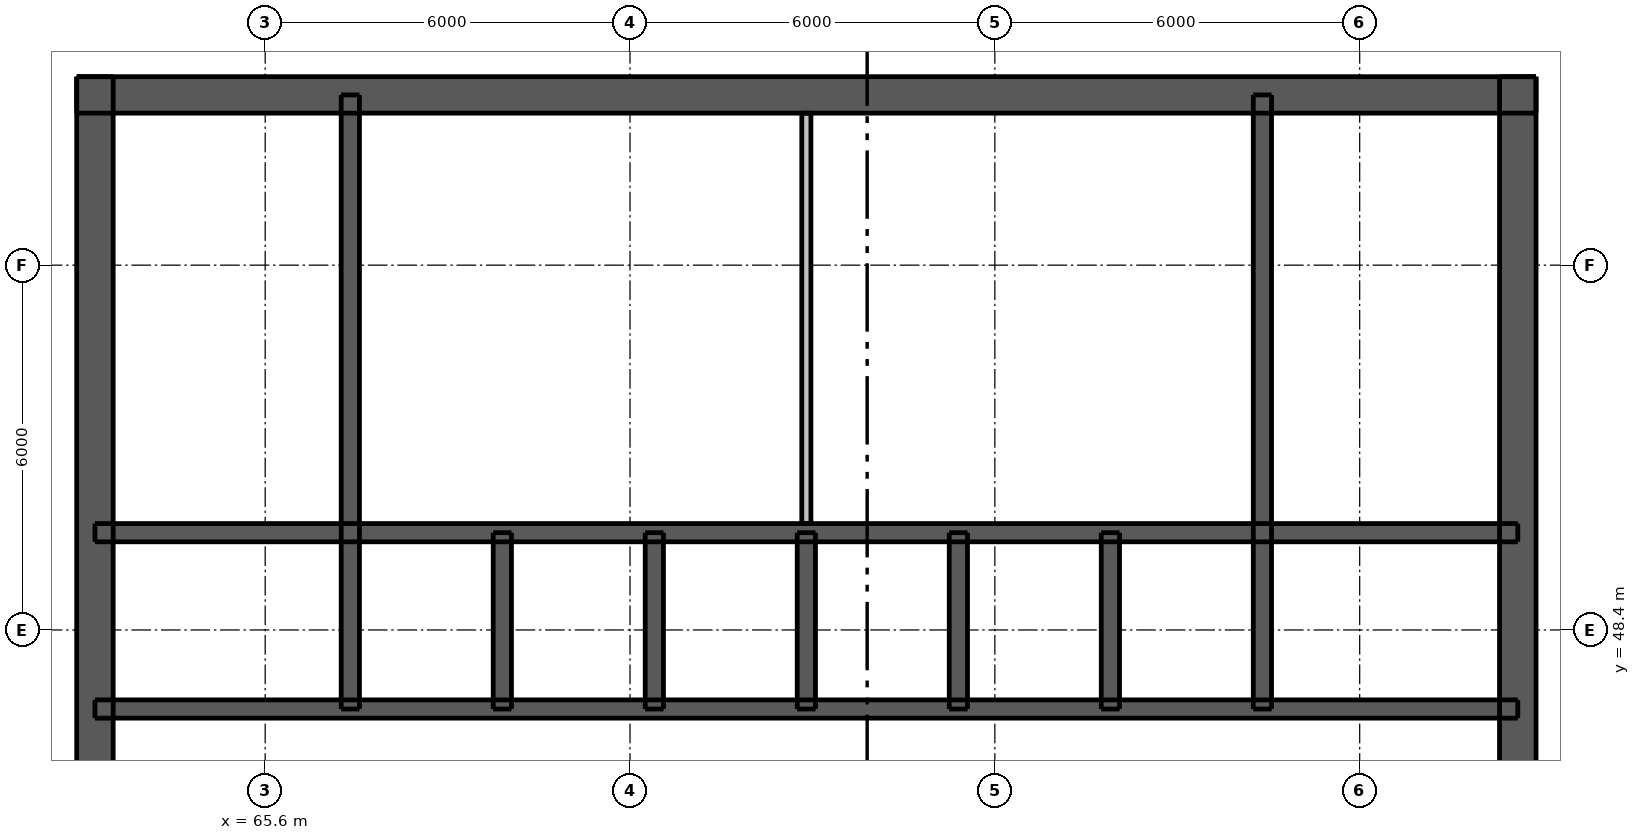
"""IFC4 building model, lengths in metres.
Left out: names, types, materials, properties, quantities, classifications, styles, units other than length and angle.
Written with IfcOpenShell. Run it as: python <this file> out.ifc"""

import sys

from ifc_helpers import new_model, si_unit, direction, frame, frame_2d, origin, place, context, subcontext, project, spatial, rectangle, extrude, element, fill, save


model = new_model("IFC4")
c1 = context("Model", 3, precision=1e-05, world=origin(), true_north=direction((0.0, 1.0)))
c2 = subcontext(c1, "Body", "Model", "MODEL_VIEW")
j1 = project(units=[si_unit("LENGTHUNIT", "METRE"), si_unit("PLANEANGLEUNIT", "RADIAN")], contexts=[c1])
p1 = place(None, origin())
s1 = spatial("IfcSite", under=j1, at=p1, CompositionType="ELEMENT")
p2 = place(p1, origin())
s2 = spatial("IfcBuilding", under=s1, at=p2, CompositionType="ELEMENT")
p3 = place(p2, frame((0.0, 0.0, 210.1)))
s3 = spatial("IfcBuildingStorey", under=s2, at=p3, CompositionType="ELEMENT", Elevation=210.1)
p4 = place(p3, frame((62.5, 57.2, 0.0), z_axis=(0.0, 0.0, 1.0), x_axis=(1.0, 0.0, 0.0)))
e1 = element("IfcWall", 1, at=p4, inside=s3, PredefinedType="SHEAR", context=c2, shape_type="SweptSolid", body=[
    extrude(rectangle(XDim=24.0, YDim=0.6, at=frame_2d((12.0, 0.0))), origin(), (0.0, 0.0, 1.0), 3.05),
])
p5 = place(p4, frame((20.975, 0.0, 0.0)))
e2 = element("IfcOpeningElement", 2, at=p5, cuts=e1, PredefinedType="OPENING", context=c2, shape_type="SweptSolid", body=[
    extrude(rectangle(XDim=1.1, YDim=2.1, at=frame_2d((0.55, 1.05))), frame((0.0, 0.31, 0.0), z_axis=(0.0, -1.0, 0.0), x_axis=(1.0, 0.0, 0.0)), (0.0, 0.0, 1.0), 0.62),
])
p6 = place(p4, frame((1.925, 0.0, 0.0)))
e3 = element("IfcOpeningElement", 3, at=p6, cuts=e1, PredefinedType="OPENING", context=c2, shape_type="SweptSolid", body=[
    extrude(rectangle(XDim=1.1, YDim=2.1, at=frame_2d((0.55, 1.05))), frame((0.0, 0.31, 0.0), z_axis=(0.0, -1.0, 0.0), x_axis=(1.0, 0.0, 0.0)), (0.0, 0.0, 1.0), 0.62),
])
p7 = place(p4, frame((7.875, 0.0, 0.0)))
e4 = element("IfcOpeningElement", 4, at=p7, cuts=e1, PredefinedType="OPENING", context=c2, shape_type="SweptSolid", body=[
    extrude(rectangle(XDim=0.9, YDim=2.1, at=frame_2d((0.45, 1.05))), frame((0.0, 0.31, 0.0), z_axis=(0.0, -1.0, 0.0), x_axis=(1.0, 0.0, 0.0)), (0.0, 0.0, 1.0), 0.62),
])
p8 = place(p4, frame((15.225, 0.0, 0.0)))
e5 = element("IfcOpeningElement", 5, at=p8, cuts=e1, PredefinedType="OPENING", context=c2, shape_type="SweptSolid", body=[
    extrude(rectangle(XDim=0.9, YDim=2.1, at=frame_2d((0.45, 1.05))), frame((0.0, 0.31, 0.0), z_axis=(0.0, -1.0, 0.0), x_axis=(1.0, 0.0, 0.0)), (0.0, 0.0, 1.0), 0.62),
])
p9 = place(p3, frame((62.8, 33.5, 0.0), z_axis=(0.0, 0.0, 1.0), x_axis=(0.0, 1.0, 0.0)))
e6 = element("IfcWall", 6, at=p9, inside=s3, PredefinedType="SHEAR", context=c2, shape_type="SweptSolid", body=[
    extrude(rectangle(XDim=24.0, YDim=0.6, at=frame_2d((12.0, 0.0))), origin(), (0.0, 0.0, 1.0), 3.05),
])
p10 = place(p9, frame((11.2, 0.0, 0.0)))
e7 = element("IfcOpeningElement", 7, at=p10, cuts=e6, PredefinedType="OPENING", context=c2, shape_type="SweptSolid", body=[
    extrude(rectangle(XDim=1.6, YDim=2.1, at=frame_2d((0.8, 1.05))), frame((0.0, 0.31, 0.0), z_axis=(0.0, -1.0, 0.0), x_axis=(1.0, 0.0, 0.0)), (0.0, 0.0, 1.0), 0.62),
])
p11 = place(p3, frame((86.2, 33.5, 0.0), z_axis=(0.0, 0.0, 1.0), x_axis=(0.0, 1.0, 0.0)))
e8 = element("IfcWall", 8, at=p11, inside=s3, PredefinedType="SHEAR", context=c2, shape_type="SweptSolid", body=[
    extrude(rectangle(XDim=24.0, YDim=0.6, at=frame_2d((12.0, 0.0))), origin(), (0.0, 0.0, 1.0), 3.05),
])
p12 = place(p11, frame((11.2, 0.0, 0.0)))
e9 = element("IfcOpeningElement", 9, at=p12, cuts=e8, PredefinedType="OPENING", context=c2, shape_type="SweptSolid", body=[
    extrude(rectangle(XDim=1.6, YDim=2.1, at=frame_2d((0.8, 1.05))), frame((0.0, 0.31, 0.0), z_axis=(0.0, -1.0, 0.0), x_axis=(1.0, 0.0, 0.0)), (0.0, 0.0, 1.0), 0.62),
])
p13 = place(p3, frame((62.8, 47.1, 0.0), z_axis=(0.0, 0.0, 1.0), x_axis=(1.0, 0.0, 0.0)))
e10 = element("IfcWall", 10, at=p13, inside=s3, PredefinedType="SHEAR", context=c2, shape_type="SweptSolid", body=[
    extrude(rectangle(XDim=23.4, YDim=0.3, at=frame_2d((11.7, 0.0))), origin(), (0.0, 0.0, 1.0), 3.05),
])
p14 = place(p13, frame((1.725, 0.0, 0.0)))
e11 = element("IfcOpeningElement", 11, at=p14, cuts=e10, PredefinedType="OPENING", context=c2, shape_type="SweptSolid", body=[
    extrude(rectangle(XDim=0.9, YDim=2.1, at=frame_2d((0.45, 1.05))), frame((0.0, 0.16, 0.0), z_axis=(0.0, -1.0, 0.0), x_axis=(1.0, 0.0, 0.0)), (0.0, 0.0, 1.0), 0.32),
])
p15 = place(p13, frame((20.775, 0.0, 0.0)))
e12 = element("IfcOpeningElement", 12, at=p15, cuts=e10, PredefinedType="OPENING", context=c2, shape_type="SweptSolid", body=[
    extrude(rectangle(XDim=0.9, YDim=2.1, at=frame_2d((0.45, 1.05))), frame((0.0, 0.16, 0.0), z_axis=(0.0, -1.0, 0.0), x_axis=(1.0, 0.0, 0.0)), (0.0, 0.0, 1.0), 0.32),
])
p16 = place(p13, frame((4.9, 0.0, 0.0)))
e13 = element("IfcOpeningElement", 13, at=p16, cuts=e10, PredefinedType="OPENING", context=c2, shape_type="SweptSolid", body=[
    extrude(rectangle(XDim=1.1, YDim=2.1, at=frame_2d((0.55, 1.05))), frame((0.0, 0.16, 0.0), z_axis=(0.0, -1.0, 0.0), x_axis=(1.0, 0.0, 0.0)), (0.0, 0.0, 1.0), 0.32),
])
p17 = place(p13, frame((7.4, 0.0, 0.0)))
e14 = element("IfcOpeningElement", 14, at=p17, cuts=e10, PredefinedType="OPENING", context=c2, shape_type="SweptSolid", body=[
    extrude(rectangle(XDim=1.1, YDim=2.1, at=frame_2d((0.55, 1.05))), frame((0.0, 0.16, 0.0), z_axis=(0.0, -1.0, 0.0), x_axis=(1.0, 0.0, 0.0)), (0.0, 0.0, 1.0), 0.32),
])
p18 = place(p13, frame((9.9, 0.0, 0.0)))
e15 = element("IfcOpeningElement", 15, at=p18, cuts=e10, PredefinedType="OPENING", context=c2, shape_type="SweptSolid", body=[
    extrude(rectangle(XDim=1.1, YDim=2.1, at=frame_2d((0.55, 1.05))), frame((0.0, 0.16, 0.0), z_axis=(0.0, -1.0, 0.0), x_axis=(1.0, 0.0, 0.0)), (0.0, 0.0, 1.0), 0.32),
])
p19 = place(p13, frame((12.4, 0.0, 0.0)))
e16 = element("IfcOpeningElement", 16, at=p19, cuts=e10, PredefinedType="OPENING", context=c2, shape_type="SweptSolid", body=[
    extrude(rectangle(XDim=1.1, YDim=2.1, at=frame_2d((0.55, 1.05))), frame((0.0, 0.16, 0.0), z_axis=(0.0, -1.0, 0.0), x_axis=(1.0, 0.0, 0.0)), (0.0, 0.0, 1.0), 0.32),
])
p20 = place(p13, frame((14.9, 0.0, 0.0)))
e17 = element("IfcOpeningElement", 17, at=p20, cuts=e10, PredefinedType="OPENING", context=c2, shape_type="SweptSolid", body=[
    extrude(rectangle(XDim=1.1, YDim=2.1, at=frame_2d((0.55, 1.05))), frame((0.0, 0.16, 0.0), z_axis=(0.0, -1.0, 0.0), x_axis=(1.0, 0.0, 0.0)), (0.0, 0.0, 1.0), 0.32),
])
p21 = place(p13, frame((17.4, 0.0, 0.0)))
e18 = element("IfcOpeningElement", 18, at=p21, cuts=e10, PredefinedType="OPENING", context=c2, shape_type="SweptSolid", body=[
    extrude(rectangle(XDim=1.1, YDim=2.1, at=frame_2d((0.55, 1.05))), frame((0.0, 0.16, 0.0), z_axis=(0.0, -1.0, 0.0), x_axis=(1.0, 0.0, 0.0)), (0.0, 0.0, 1.0), 0.32),
])
p22 = place(p3, frame((62.8, 50.0, 0.0), z_axis=(0.0, 0.0, 1.0), x_axis=(1.0, 0.0, 0.0)))
e19 = element("IfcWall", 19, at=p22, inside=s3, PredefinedType="SHEAR", context=c2, shape_type="SweptSolid", body=[
    extrude(rectangle(XDim=23.4, YDim=0.3, at=frame_2d((11.7, 0.0))), origin(), (0.0, 0.0, 1.0), 3.05),
])
for number, where, z_axis, x_axis in (
    (20, (67.0, 47.1, 0.0), (0.0, 0.0, 1.0), (0.0, 1.0, 0.0)),
    (21, (82.0, 47.1, 0.0), (0.0, 0.0, 1.0), (0.0, 1.0, 0.0)),
):
    element("IfcWall", number, at=place(p3, frame(where, z_axis=z_axis, x_axis=x_axis)), inside=s3, PredefinedType="SHEAR", context=c2, shape_type="SweptSolid", body=[
        extrude(rectangle(XDim=10.1, YDim=0.3, at=frame_2d((5.05, 0.0))), origin(), (0.0, 0.0, 1.0), 3.05),
    ])
for number, where, z_axis, x_axis in (
    (22, (69.5, 47.1, 0.0), (0.0, 0.0, 1.0), (0.0, 1.0, 0.0)),
    (23, (72.0, 47.1, 0.0), (0.0, 0.0, 1.0), (0.0, 1.0, 0.0)),
    (24, (74.5, 47.1, 0.0), (0.0, 0.0, 1.0), (0.0, 1.0, 0.0)),
    (25, (77.0, 47.1, 0.0), (0.0, 0.0, 1.0), (0.0, 1.0, 0.0)),
    (26, (79.5, 47.1, 0.0), (0.0, 0.0, 1.0), (0.0, 1.0, 0.0)),
):
    element("IfcWall", number, at=place(p3, frame(where, z_axis=z_axis, x_axis=x_axis)), inside=s3, PredefinedType="SHEAR", context=c2, shape_type="SweptSolid", body=[
        extrude(rectangle(XDim=2.9, YDim=0.3, at=frame_2d((1.45, 0.0))), origin(), (0.0, 0.0, 1.0), 3.05),
    ])
p23 = place(p3, frame((74.5, 50.15, 0.0), z_axis=(0.0, 0.0, 1.0), x_axis=(0.0, 1.0, 0.0)))
e27 = element("IfcWall", 27, at=p23, inside=s3, PredefinedType="PLUMBINGWALL", context=c2, shape_type="SweptSolid", body=[
    extrude(rectangle(XDim=6.75, YDim=0.15, at=frame_2d((3.375, 0.0))), origin(), (0.0, 0.0, 1.0), 3.05),
])
p24 = place(p5, origin())
e28 = element("IfcDoor", 28, at=p24, inside=s3, OperationType="SINGLE_SWING_RIGHT", PredefinedType="DOOR", context=c2, shape_type="SweptSolid", body=[
    extrude(rectangle(XDim=1.1, YDim=2.1, at=frame_2d((0.55, 1.05))), frame((0.0, -0.237, 0.0), z_axis=(0.0, -1.0, 0.0), x_axis=(1.0, 0.0, 0.0)), (0.0, 0.0, 1.0), 0.05),
])
fill(e2, e28)
p25 = place(p6, origin())
e29 = element("IfcDoor", 29, at=p25, inside=s3, OperationType="SINGLE_SWING_LEFT", PredefinedType="DOOR", context=c2, shape_type="SweptSolid", body=[
    extrude(rectangle(XDim=1.1, YDim=2.1, at=frame_2d((0.55, 1.05))), frame((0.0, -0.237, 0.0), z_axis=(0.0, -1.0, 0.0), x_axis=(1.0, 0.0, 0.0)), (0.0, 0.0, 1.0), 0.05),
])
fill(e3, e29)
p26 = place(p10, origin())
e30 = element("IfcDoor", 30, at=p26, inside=s3, OperationType="DOUBLE_DOOR_SINGLE_SWING", PredefinedType="DOOR", context=c2, shape_type="SweptSolid", body=[
    extrude(rectangle(XDim=1.6, YDim=2.1, at=frame_2d((0.8, 1.05))), frame((0.0, -0.237, 0.0), z_axis=(0.0, -1.0, 0.0), x_axis=(1.0, 0.0, 0.0)), (0.0, 0.0, 1.0), 0.05),
])
fill(e7, e30)
p27 = place(p12, origin())
e31 = element("IfcDoor", 31, at=p27, inside=s3, OperationType="DOUBLE_DOOR_SINGLE_SWING", PredefinedType="DOOR", context=c2, shape_type="SweptSolid", body=[
    extrude(rectangle(XDim=1.6, YDim=2.1, at=frame_2d((0.8, 1.05))), frame((0.0, 0.288, 0.0), z_axis=(0.0, -1.0, 0.0), x_axis=(1.0, 0.0, 0.0)), (0.0, 0.0, 1.0), 0.05),
])
fill(e9, e31)
p28 = place(p14, origin())
e32 = element("IfcDoor", 32, at=p28, inside=s3, OperationType="SINGLE_SWING_LEFT", PredefinedType="DOOR", context=c2, shape_type="SweptSolid", body=[
    extrude(rectangle(XDim=0.9, YDim=2.1, at=frame_2d((0.45, 1.05))), frame((0.0, 0.138, 0.0), z_axis=(0.0, -1.0, 0.0), x_axis=(1.0, 0.0, 0.0)), (0.0, 0.0, 1.0), 0.05),
])
fill(e11, e32)
p29 = place(p15, origin())
e33 = element("IfcDoor", 33, at=p29, inside=s3, OperationType="SINGLE_SWING_LEFT", PredefinedType="DOOR", context=c2, shape_type="SweptSolid", body=[
    extrude(rectangle(XDim=0.9, YDim=2.1, at=frame_2d((0.45, 1.05))), frame((0.0, 0.138, 0.0), z_axis=(0.0, -1.0, 0.0), x_axis=(1.0, 0.0, 0.0)), (0.0, 0.0, 1.0), 0.05),
])
fill(e12, e33)
p30 = place(p7, origin())
e34 = element("IfcDoor", 34, at=p30, inside=s3, OperationType="SINGLE_SWING_RIGHT", PredefinedType="DOOR", context=c2, shape_type="SweptSolid", body=[
    extrude(rectangle(XDim=0.9, YDim=2.1, at=frame_2d((0.45, 1.05))), frame((0.0, -0.237, 0.0), z_axis=(0.0, -1.0, 0.0), x_axis=(1.0, 0.0, 0.0)), (0.0, 0.0, 1.0), 0.05),
])
fill(e4, e34)
p31 = place(p8, origin())
e35 = element("IfcDoor", 35, at=p31, inside=s3, OperationType="SINGLE_SWING_RIGHT", PredefinedType="DOOR", context=c2, shape_type="SweptSolid", body=[
    extrude(rectangle(XDim=0.9, YDim=2.1, at=frame_2d((0.45, 1.05))), frame((0.0, -0.237, 0.0), z_axis=(0.0, -1.0, 0.0), x_axis=(1.0, 0.0, 0.0)), (0.0, 0.0, 1.0), 0.05),
])
fill(e5, e35)
p32 = place(p16, origin())
e36 = element("IfcDoor", 36, at=p32, inside=s3, OperationType="DOUBLE_DOOR_SLIDING", PredefinedType="DOOR", context=c2, shape_type="SweptSolid", body=[
    extrude(rectangle(XDim=1.1, YDim=2.1, at=frame_2d((0.55, 1.05))), frame((0.0, 0.025, 0.0), z_axis=(0.0, -1.0, 0.0), x_axis=(1.0, 0.0, 0.0)), (0.0, 0.0, 1.0), 0.05),
])
fill(e13, e36)
p33 = place(p17, origin())
e37 = element("IfcDoor", 37, at=p33, inside=s3, OperationType="DOUBLE_DOOR_SLIDING", PredefinedType="DOOR", context=c2, shape_type="SweptSolid", body=[
    extrude(rectangle(XDim=1.1, YDim=2.1, at=frame_2d((0.55, 1.05))), frame((0.0, 0.025, 0.0), z_axis=(0.0, -1.0, 0.0), x_axis=(1.0, 0.0, 0.0)), (0.0, 0.0, 1.0), 0.05),
])
fill(e14, e37)
p34 = place(p18, origin())
e38 = element("IfcDoor", 38, at=p34, inside=s3, OperationType="DOUBLE_DOOR_SLIDING", PredefinedType="DOOR", context=c2, shape_type="SweptSolid", body=[
    extrude(rectangle(XDim=1.1, YDim=2.1, at=frame_2d((0.55, 1.05))), frame((0.0, 0.025, 0.0), z_axis=(0.0, -1.0, 0.0), x_axis=(1.0, 0.0, 0.0)), (0.0, 0.0, 1.0), 0.05),
])
fill(e15, e38)
p35 = place(p19, origin())
e39 = element("IfcDoor", 39, at=p35, inside=s3, OperationType="DOUBLE_DOOR_SLIDING", PredefinedType="DOOR", context=c2, shape_type="SweptSolid", body=[
    extrude(rectangle(XDim=1.1, YDim=2.1, at=frame_2d((0.55, 1.05))), frame((0.0, 0.025, 0.0), z_axis=(0.0, -1.0, 0.0), x_axis=(1.0, 0.0, 0.0)), (0.0, 0.0, 1.0), 0.05),
])
fill(e16, e39)
p36 = place(p20, origin())
e40 = element("IfcDoor", 40, at=p36, inside=s3, OperationType="DOUBLE_DOOR_SLIDING", PredefinedType="DOOR", context=c2, shape_type="SweptSolid", body=[
    extrude(rectangle(XDim=1.1, YDim=2.1, at=frame_2d((0.55, 1.05))), frame((0.0, 0.025, 0.0), z_axis=(0.0, -1.0, 0.0), x_axis=(1.0, 0.0, 0.0)), (0.0, 0.0, 1.0), 0.05),
])
fill(e17, e40)
p37 = place(p21, origin())
e41 = element("IfcDoor", 41, at=p37, inside=s3, OperationType="DOUBLE_DOOR_SLIDING", PredefinedType="DOOR", context=c2, shape_type="SweptSolid", body=[
    extrude(rectangle(XDim=1.1, YDim=2.1, at=frame_2d((0.55, 1.05))), frame((0.0, 0.025, 0.0), z_axis=(0.0, -1.0, 0.0), x_axis=(1.0, 0.0, 0.0)), (0.0, 0.0, 1.0), 0.05),
])
fill(e18, e41)
save(model, sys.argv[1])
